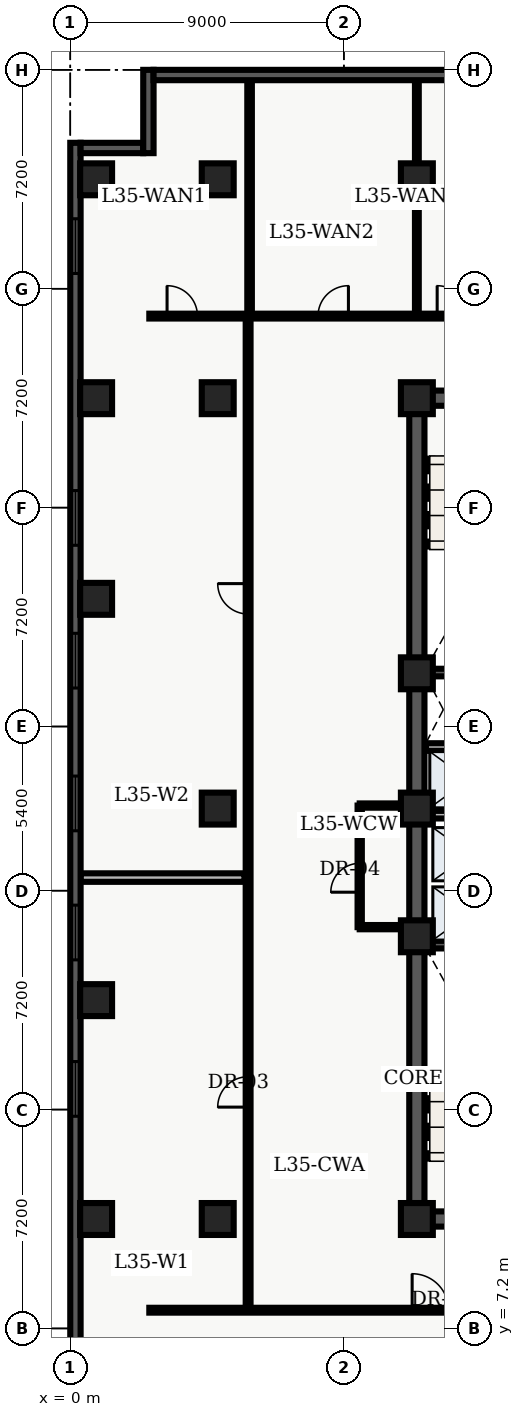
"""IFC4 building model, lengths in metres.
Left out: names, types, materials, properties, quantities, classifications, styles, units other than length and angle.
Written with IfcOpenShell. Run it as: python <this file> out.ifc"""

import sys

from ifc_helpers import new_model, entity, si_unit, converted_unit, direction, frame, origin_with_axes, origin_2d_with_axis, place, context, subcontext, project, spatial, polyline, rectangle, outline, extrude, element, fill, save


model = new_model("IFC4")
c1 = context("Model", 3, precision=1e-05, world=origin_with_axes(), true_north=direction((0.0, 1.0)))
c2 = subcontext(c1, "Body", "Model", "MODEL_VIEW")
j1 = project(units=[si_unit("LENGTHUNIT", "METRE"), converted_unit("PLANEANGLEUNIT", "DEGREE", entity("IfcPlaneAngleMeasure", 0.017), si_unit("PLANEANGLEUNIT", "RADIAN"), dimensions=[0, 0, 0, 0, 0, 0, 0])], contexts=[c1])
p1 = place(None, origin_with_axes())
s1 = spatial("IfcSite", under=j1, at=p1, CompositionType="ELEMENT")
p2 = place(p1, origin_with_axes())
s2 = spatial("IfcBuilding", under=s1, at=p2, CompositionType="ELEMENT")
p3 = place(p2, frame((0.0, 0.0, 144.6), z_axis=(0.0, 0.0, 1.0), x_axis=(1.0, 0.0, 0.0)))
s3 = spatial("IfcBuildingStorey", under=s2, at=p3, CompositionType="ELEMENT", Elevation=144.6)
p4 = place(p3, frame((11.4, 10.8, 0.0), z_axis=(0.0, 0.0, 1.0), x_axis=(0.0, 1.0, 0.0)))
e1 = element("IfcWall", 1, at=p4, inside=s3, PredefinedType="SHEAR", context=c2, shape_type="SweptSolid", body=[
    extrude(outline(polyline([(0.0, -0.25), (27.0, -0.25), (27.0, 0.25), (0.0, 0.25), (0.0, -0.25)])), origin_with_axes(), (0.0, 0.0, 1.0), 3.66),
])
p5 = place(p3, frame((11.4, 10.8, 0.0), z_axis=(0.0, 0.0, 1.0), x_axis=(1.0, 0.0, 0.0)))
e2 = element("IfcWall", 2, at=p5, inside=s3, PredefinedType="SHEAR", context=c2, shape_type="SweptSolid", body=[
    extrude(outline(polyline([(0.0, -0.25), (7.2, -0.25), (7.2, 0.25), (0.0, 0.25), (0.0, -0.25)])), origin_with_axes(), (0.0, 0.0, 1.0), 3.66),
])
p6 = place(p5, frame((2.625, 0.0, 0.0), z_axis=(0.0, 0.0, 1.0), x_axis=(1.0, 0.0, 0.0)))
e3 = element("IfcOpeningElement", 3, at=p6, cuts=e2, PredefinedType="OPENING", context=c2, shape_type="SweptSolid", body=[
    extrude(rectangle(XDim=1.05, YDim=0.52, at=origin_2d_with_axis()), origin_with_axes(), (0.0, 0.0, 1.0), 2.15),
])
p7 = place(p3, frame((11.4, 37.8, 0.0), z_axis=(0.0, 0.0, 1.0), x_axis=(1.0, 0.0, 0.0)))
e4 = element("IfcWall", 4, at=p7, inside=s3, PredefinedType="SHEAR", context=c2, shape_type="SweptSolid", body=[
    extrude(outline(polyline([(0.0, -0.25), (7.2, -0.25), (7.2, 0.25), (0.0, 0.25), (0.0, -0.25)])), origin_with_axes(), (0.0, 0.0, 1.0), 3.66),
])
p8 = place(p7, frame((2.625, 0.0, 0.0), z_axis=(0.0, 0.0, 1.0), x_axis=(1.0, 0.0, 0.0)))
e5 = element("IfcOpeningElement", 5, at=p8, cuts=e4, PredefinedType="OPENING", context=c2, shape_type="SweptSolid", body=[
    extrude(rectangle(XDim=1.05, YDim=0.52, at=origin_2d_with_axis()), origin_with_axes(), (0.0, 0.0, 1.0), 2.15),
])
for number, where, z_axis, x_axis in (
    (6, (11.65, 19.825, 0.0), (0.0, 0.0, 1.0), (1.0, 0.0, 0.0)),
    (7, (11.65, 28.775, 0.0), (0.0, 0.0, 1.0), (1.0, 0.0, 0.0)),
):
    element("IfcWall", number, at=place(p3, frame(where, z_axis=z_axis, x_axis=x_axis)), inside=s3, PredefinedType="SHEAR", context=c2, shape_type="SweptSolid", body=[
        extrude(outline(polyline([(0.0, -0.125), (6.7, -0.125), (6.7, 0.125), (0.0, 0.125), (0.0, -0.125)])), origin_with_axes(), (0.0, 0.0, 1.0), 3.66),
    ])
p9 = place(p3, frame((11.7, 24.1, 0.0), z_axis=(0.0, 0.0, 1.0), x_axis=(1.0, 0.0, 0.0)))
e8 = element("IfcWall", 8, at=p9, inside=s3, PredefinedType="SOLIDWALL", context=c2, shape_type="SweptSolid", body=[
    extrude(outline(polyline([(0.0, -0.125), (6.6, -0.125), (6.6, 0.125), (0.0, 0.125), (0.0, -0.125)])), origin_with_axes(), (0.0, 0.0, 1.0), 2.7),
])
p10 = place(p9, frame((3.6, 0.0, 0.0), z_axis=(0.0, 0.0, 1.0), x_axis=(1.0, 0.0, 0.0)))
e9 = element("IfcOpeningElement", 9, at=p10, cuts=e8, PredefinedType="OPENING", context=c2, shape_type="SweptSolid", body=[
    extrude(rectangle(XDim=0.9, YDim=0.27, at=origin_2d_with_axis()), origin_with_axes(), (0.0, 0.0, 1.0), 2.15),
])
p11 = place(p9, frame((5.65, 0.0, 0.0), z_axis=(0.0, 0.0, 1.0), x_axis=(1.0, 0.0, 0.0)))
e10 = element("IfcOpeningElement", 10, at=p11, cuts=e8, PredefinedType="OPENING", context=c2, shape_type="SweptSolid", body=[
    extrude(rectangle(XDim=0.9, YDim=0.27, at=origin_2d_with_axis()), origin_with_axes(), (0.0, 0.0, 1.0), 2.15),
])
p12 = place(p3, frame((11.7, 26.325, 0.0), z_axis=(0.0, 0.0, 1.0), x_axis=(1.0, 0.0, 0.0)))
e11 = element("IfcWall", 11, at=p12, inside=s3, PredefinedType="SOLIDWALL", context=c2, shape_type="SweptSolid", body=[
    extrude(outline(polyline([(0.0, -0.125), (6.6, -0.125), (6.6, 0.125), (0.0, 0.125), (0.0, -0.125)])), origin_with_axes(), (0.0, 0.0, 1.0), 2.7),
])
p13 = place(p12, frame((3.5, 0.0, 0.0), z_axis=(0.0, 0.0, 1.0), x_axis=(1.0, 0.0, 0.0)))
e12 = element("IfcOpeningElement", 12, at=p13, cuts=e11, PredefinedType="OPENING", context=c2, shape_type="SweptSolid", body=[
    extrude(rectangle(XDim=0.9, YDim=0.27, at=origin_2d_with_axis()), origin_with_axes(), (0.0, 0.0, 1.0), 2.15),
])
for number, where, z_axis, x_axis in (
    (13, (11.4, 10.8, 0.0), (0.0, 0.0, 1.0), (1.0, 0.0, 0.0)),
    (14, (11.4, 20.1, 0.0), (0.0, 0.0, 1.0), (1.0, 0.0, 0.0)),
    (15, (11.4, 24.3, 0.0), (0.0, 0.0, 1.0), (1.0, 0.0, 0.0)),
    (16, (11.4, 28.75, 0.0), (0.0, 0.0, 1.0), (1.0, 0.0, 0.0)),
    (17, (11.4, 37.8, 0.0), (0.0, 0.0, 1.0), (1.0, 0.0, 0.0)),
    (18, (11.4, 45.0, 0.0), (0.0, 0.0, 1.0), (1.0, 0.0, 0.0)),
    (19, (4.85, 10.8, 0.0), (0.0, 0.0, 1.0), (1.0, 0.0, 0.0)),
    (20, (4.85, 24.3, 0.0), (0.0, 0.0, 1.0), (1.0, 0.0, 0.0)),
    (21, (4.85, 37.8, 0.0), (0.0, 0.0, 1.0), (1.0, 0.0, 0.0)),
    (22, (4.85, 45.0, 0.0), (0.0, 0.0, 1.0), (1.0, 0.0, 0.0)),
    (23, (0.85, 10.8, 0.0), (0.0, 0.0, 1.0), (1.0, 0.0, 0.0)),
    (24, (0.85, 18.0, 0.0), (0.0, 0.0, 1.0), (1.0, 0.0, 0.0)),
    (25, (0.85, 31.2, 0.0), (0.0, 0.0, 1.0), (1.0, 0.0, 0.0)),
    (26, (0.85, 37.8, 0.0), (0.0, 0.0, 1.0), (1.0, 0.0, 0.0)),
    (27, (0.85, 45.0, 0.0), (0.0, 0.0, 1.0), (1.0, 0.0, 0.0)),
):
    element("IfcColumn", number, at=place(p3, frame(where, z_axis=z_axis, x_axis=x_axis)), inside=s3, PredefinedType="COLUMN", context=c2, shape_type="SweptSolid", body=[
        extrude(rectangle(XDim=1.05, YDim=1.05, at=origin_2d_with_axis()), origin_with_axes(), (0.0, 0.0, 1.0), 3.9),
    ])
p14 = place(p3, frame((9.52, 20.4, 0.0), z_axis=(0.0, 0.0, 1.0), x_axis=(0.0, 1.0, 0.0)))
e28 = element("IfcWall", 28, at=p14, inside=s3, PredefinedType="PARTITIONING", context=c2, shape_type="SweptSolid", body=[
    extrude(outline(polyline([(0.0, -0.07), (4.0, -0.07), (4.0, 0.07), (0.0, 0.07), (0.0, -0.07)])), origin_with_axes(), (0.0, 0.0, 1.0), 2.7),
])
p15 = place(p14, frame((1.625, 0.0, 0.0), z_axis=(0.0, 0.0, 1.0), x_axis=(1.0, 0.0, 0.0)))
e29 = element("IfcOpeningElement", 29, at=p15, cuts=e28, PredefinedType="OPENING", context=c2, shape_type="SweptSolid", body=[
    extrude(rectangle(XDim=0.95, YDim=0.16, at=origin_2d_with_axis()), origin_with_axes(), (0.0, 0.0, 1.0), 2.15),
])
for number, where, z_axis, x_axis in (
    (30, (9.52, 20.4, 0.0), (0.0, 0.0, 1.0), (1.0, 0.0, 0.0)),
    (31, (9.52, 24.4, 0.0), (0.0, 0.0, 1.0), (1.0, 0.0, 0.0)),
):
    element("IfcWall", number, at=place(p3, frame(where, z_axis=z_axis, x_axis=x_axis)), inside=s3, PredefinedType="PARTITIONING", context=c2, shape_type="SweptSolid", body=[
        extrude(outline(polyline([(0.0, -0.07), (1.58, -0.07), (1.58, 0.07), (0.0, 0.07), (0.0, -0.07)])), origin_with_axes(), (0.0, 0.0, 1.0), 2.7),
    ])
p16 = place(p3, frame((2.6, 7.8, 0.0), z_axis=(0.0, 0.0, 1.0), x_axis=(1.0, 0.0, 0.0)))
e32 = element("IfcWall", 32, at=p16, inside=s3, PredefinedType="PARTITIONING", context=c2, shape_type="SweptSolid", body=[
    extrude(outline(polyline([(0.0, -0.08), (18.55, -0.08), (18.55, 0.08), (0.0, 0.08), (0.0, -0.08)])), origin_with_axes(), (0.0, 0.0, 1.0), 2.7),
])
p17 = place(p16, frame((9.245, 0.0, 0.0), z_axis=(0.0, 0.0, 1.0), x_axis=(1.0, 0.0, 0.0)))
e33 = element("IfcOpeningElement", 33, at=p17, cuts=e32, PredefinedType="OPENING", context=c2, shape_type="SweptSolid", body=[
    extrude(rectangle(XDim=1.2, YDim=0.18, at=origin_2d_with_axis()), origin_with_axes(), (0.0, 0.0, 1.0), 2.2),
])
p18 = place(p3, frame((2.6, 40.5, 0.0), z_axis=(0.0, 0.0, 1.0), x_axis=(1.0, 0.0, 0.0)))
e34 = element("IfcWall", 34, at=p18, inside=s3, PredefinedType="PARTITIONING", context=c2, shape_type="SweptSolid", body=[
    extrude(outline(polyline([(0.0, -0.08), (19.26, -0.08), (19.26, 0.08), (0.0, 0.08), (0.0, -0.08)])), origin_with_axes(), (0.0, 0.0, 1.0), 2.7),
])
p19 = place(p18, frame((1.084, 0.0, 0.0), z_axis=(0.0, 0.0, 1.0), x_axis=(1.0, 0.0, 0.0)))
e35 = element("IfcOpeningElement", 35, at=p19, cuts=e34, PredefinedType="OPENING", context=c2, shape_type="SweptSolid", body=[
    extrude(rectangle(XDim=1.0, YDim=0.18, at=origin_2d_with_axis()), origin_with_axes(), (0.0, 0.0, 1.0), 2.15),
])
p20 = place(p18, frame((6.049, 0.0, 0.0), z_axis=(0.0, 0.0, 1.0), x_axis=(1.0, 0.0, 0.0)))
e36 = element("IfcOpeningElement", 36, at=p20, cuts=e34, PredefinedType="OPENING", context=c2, shape_type="SweptSolid", body=[
    extrude(rectangle(XDim=1.0, YDim=0.18, at=origin_2d_with_axis()), origin_with_axes(), (0.0, 0.0, 1.0), 2.15),
])
p21 = place(p18, frame((9.968, 0.0, 0.0), z_axis=(0.0, 0.0, 1.0), x_axis=(1.0, 0.0, 0.0)))
e37 = element("IfcOpeningElement", 37, at=p21, cuts=e34, PredefinedType="OPENING", context=c2, shape_type="SweptSolid", body=[
    extrude(rectangle(XDim=1.0, YDim=0.18, at=origin_2d_with_axis()), origin_with_axes(), (0.0, 0.0, 1.0), 2.15),
])
p22 = place(p18, frame((13.601, 0.0, 0.0), z_axis=(0.0, 0.0, 1.0), x_axis=(1.0, 0.0, 0.0)))
e38 = element("IfcOpeningElement", 38, at=p22, cuts=e34, PredefinedType="OPENING", context=c2, shape_type="SweptSolid", body=[
    extrude(rectangle(XDim=1.2, YDim=0.18, at=origin_2d_with_axis()), origin_with_axes(), (0.0, 0.0, 1.0), 2.2),
])
p23 = place(p3, frame((5.85, 7.8, 0.0), z_axis=(0.0, 0.0, 1.0), x_axis=(0.0, 1.0, 0.0)))
e39 = element("IfcWall", 39, at=p23, inside=s3, PredefinedType="PARTITIONING", context=c2, shape_type="SweptSolid", body=[
    extrude(outline(polyline([(0.0, -0.08), (32.7, -0.08), (32.7, 0.08), (0.0, 0.08), (0.0, -0.08)])), origin_with_axes(), (0.0, 0.0, 1.0), 2.7),
])
p24 = place(p23, frame((7.181, 0.0, 0.0), z_axis=(0.0, 0.0, 1.0), x_axis=(1.0, 0.0, 0.0)))
e40 = element("IfcOpeningElement", 40, at=p24, cuts=e39, PredefinedType="OPENING", context=c2, shape_type="SweptSolid", body=[
    extrude(rectangle(XDim=1.0, YDim=0.18, at=origin_2d_with_axis()), origin_with_axes(), (0.0, 0.0, 1.0), 2.15),
])
p25 = place(p23, frame((23.401, 0.0, 0.0), z_axis=(0.0, 0.0, 1.0), x_axis=(1.0, 0.0, 0.0)))
e41 = element("IfcOpeningElement", 41, at=p25, cuts=e39, PredefinedType="OPENING", context=c2, shape_type="SweptSolid", body=[
    extrude(rectangle(XDim=1.0, YDim=0.18, at=origin_2d_with_axis()), origin_with_axes(), (0.0, 0.0, 1.0), 2.15),
])
p26 = place(p3, frame((0.335, 22.031, 0.0), z_axis=(0.0, 0.0, 1.0), x_axis=(1.0, 0.0, 0.0)))
e42 = element("IfcWall", 42, at=p26, inside=s3, PredefinedType="PARTITIONING", context=c2, shape_type="SweptSolid", body=[
    extrude(outline(polyline([(0.0, -0.14), (5.395, -0.14), (5.395, 0.14), (0.0, 0.14), (0.0, -0.14)])), origin_with_axes(), (0.0, 0.0, 1.0), 2.7),
])
p27 = place(p3, frame((5.898, 40.6, 0.0), z_axis=(0.0, 0.0, 1.0), x_axis=(0.0, 1.0, 0.0)))
e43 = element("IfcWall", 43, at=p27, inside=s3, PredefinedType="PARTITIONING", context=c2, shape_type="SweptSolid", body=[
    extrude(outline(polyline([(0.0, -0.075), (7.665, -0.075), (7.665, 0.075), (0.0, 0.075), (0.0, -0.075)])), origin_with_axes(), (0.0, 0.0, 1.0), 2.7),
])
p28 = place(p3, frame((11.4, 40.6, 0.0), z_axis=(0.0, 0.0, 1.0), x_axis=(0.0, 1.0, 0.0)))
e44 = element("IfcWall", 44, at=p28, inside=s3, PredefinedType="PARTITIONING", context=c2, shape_type="SweptSolid", body=[
    extrude(outline(polyline([(0.0, -0.062), (7.665, -0.062), (7.665, 0.062), (0.0, 0.062), (0.0, -0.062)])), origin_with_axes(), (0.0, 0.0, 1.0), 2.7),
])
p29 = place(p3, frame((0.17, 2.74, 0.0), z_axis=(0.0, 0.0, 1.0), x_axis=(0.0, 1.0, 0.0)))
e45 = element("IfcWall", 45, at=p29, inside=s3, PredefinedType="SOLIDWALL", context=c2, shape_type="SweptSolid", body=[
    extrude(outline(polyline([(0.0, -0.17), (43.46, -0.17), (43.46, 0.17), (0.0, 0.17), (0.0, -0.17)])), origin_with_axes(), (0.0, 0.0, 1.0), 3.66),
])
p30 = place(p29, frame((2.948, 0.0, 0.45), z_axis=(0.0, 0.0, 1.0), x_axis=(1.0, 0.0, 0.0)))
e46 = element("IfcOpeningElement", 46, at=p30, cuts=e45, PredefinedType="OPENING", context=c2, shape_type="SweptSolid", body=[
    extrude(rectangle(XDim=1.8, YDim=0.36, at=origin_2d_with_axis()), origin_with_axes(), (0.0, 0.0, 1.0), 2.1),
])
p31 = place(p29, frame((12.339, 0.0, 0.45), z_axis=(0.0, 0.0, 1.0), x_axis=(1.0, 0.0, 0.0)))
e47 = element("IfcOpeningElement", 47, at=p31, cuts=e45, PredefinedType="OPENING", context=c2, shape_type="SweptSolid", body=[
    extrude(rectangle(XDim=1.8, YDim=0.36, at=origin_2d_with_axis()), origin_with_axes(), (0.0, 0.0, 1.0), 2.1),
])
p32 = place(p29, frame((17.484, 0.0, 0.45), z_axis=(0.0, 0.0, 1.0), x_axis=(1.0, 0.0, 0.0)))
e48 = element("IfcOpeningElement", 48, at=p32, cuts=e45, PredefinedType="OPENING", context=c2, shape_type="SweptSolid", body=[
    extrude(rectangle(XDim=1.8, YDim=0.36, at=origin_2d_with_axis()), origin_with_axes(), (0.0, 0.0, 1.0), 2.1),
])
p33 = place(p29, frame((21.73, 0.0, 0.45), z_axis=(0.0, 0.0, 1.0), x_axis=(1.0, 0.0, 0.0)))
e49 = element("IfcOpeningElement", 49, at=p33, cuts=e45, PredefinedType="OPENING", context=c2, shape_type="SweptSolid", body=[
    extrude(rectangle(XDim=1.8, YDim=0.36, at=origin_2d_with_axis()), origin_with_axes(), (0.0, 0.0, 1.0), 2.1),
])
p34 = place(p29, frame((26.426, 0.0, 0.45), z_axis=(0.0, 0.0, 1.0), x_axis=(1.0, 0.0, 0.0)))
e50 = element("IfcOpeningElement", 50, at=p34, cuts=e45, PredefinedType="OPENING", context=c2, shape_type="SweptSolid", body=[
    extrude(rectangle(XDim=1.8, YDim=0.36, at=origin_2d_with_axis()), origin_with_axes(), (0.0, 0.0, 1.0), 2.1),
])
p35 = place(p29, frame((31.121, 0.0, 0.45), z_axis=(0.0, 0.0, 1.0), x_axis=(1.0, 0.0, 0.0)))
e51 = element("IfcOpeningElement", 51, at=p35, cuts=e45, PredefinedType="OPENING", context=c2, shape_type="SweptSolid", body=[
    extrude(rectangle(XDim=1.8, YDim=0.36, at=origin_2d_with_axis()), origin_with_axes(), (0.0, 0.0, 1.0), 2.1),
])
p36 = place(p29, frame((40.062, 0.0, 0.45), z_axis=(0.0, 0.0, 1.0), x_axis=(1.0, 0.0, 0.0)))
e52 = element("IfcOpeningElement", 52, at=p36, cuts=e45, PredefinedType="OPENING", context=c2, shape_type="SweptSolid", body=[
    extrude(rectangle(XDim=1.8, YDim=0.36, at=origin_2d_with_axis()), origin_with_axes(), (0.0, 0.0, 1.0), 2.1),
])
p37 = place(p3, frame((0.34, 46.03, 0.0), z_axis=(0.0, 0.0, 1.0), x_axis=(1.0, 0.0, 0.0)))
e53 = element("IfcWall", 53, at=p37, inside=s3, PredefinedType="SOLIDWALL", context=c2, shape_type="SweptSolid", body=[
    extrude(outline(polyline([(0.0, -0.17), (2.06, -0.17), (2.06, 0.17), (0.0, 0.17), (0.0, -0.17)])), origin_with_axes(), (0.0, 0.0, 1.0), 3.66),
])
p38 = place(p3, frame((2.57, 45.86, 0.0), z_axis=(0.0, 0.0, 1.0), x_axis=(0.0, 1.0, 0.0)))
e54 = element("IfcWall", 54, at=p38, inside=s3, PredefinedType="SOLIDWALL", context=c2, shape_type="SweptSolid", body=[
    extrude(outline(polyline([(0.0, -0.17), (2.74, -0.17), (2.74, 0.17), (0.0, 0.17), (0.0, -0.17)])), origin_with_axes(), (0.0, 0.0, 1.0), 3.66),
])
p39 = place(p3, frame((2.74, 48.43, 0.0), z_axis=(0.0, 0.0, 1.0), x_axis=(1.0, 0.0, 0.0)))
e55 = element("IfcWall", 55, at=p39, inside=s3, PredefinedType="SOLIDWALL", context=c2, shape_type="SweptSolid", body=[
    extrude(outline(polyline([(0.0, -0.17), (17.175, -0.17), (17.175, 0.17), (0.0, 0.17), (0.0, -0.17)])), origin_with_axes(), (0.0, 0.0, 1.0), 3.66),
])
p40 = place(p39, frame((13.912, 0.0, 0.45), z_axis=(0.0, 0.0, 1.0), x_axis=(1.0, 0.0, 0.0)))
e56 = element("IfcOpeningElement", 56, at=p40, cuts=e55, PredefinedType="OPENING", context=c2, shape_type="SweptSolid", body=[
    extrude(rectangle(XDim=1.8, YDim=0.36, at=origin_2d_with_axis()), origin_with_axes(), (0.0, 0.0, 1.0), 2.1),
])
p41 = place(p14, frame((1.625, 0.0, 0.0), z_axis=(0.0, 0.0, 1.0), x_axis=(1.0, 0.0, 0.0)))
e57 = element("IfcDoor", 57, at=p41, inside=s3, OperationType="SINGLE_SWING_LEFT", PredefinedType="DOOR", context=c2, shape_type="SweptSolid", body=[
    extrude(rectangle(XDim=0.95, YDim=0.084, at=origin_2d_with_axis()), origin_with_axes(), (0.0, 0.0, 1.0), 2.15),
])
fill(e29, e57)
p42 = place(p23, frame((7.181, 0.0, 0.0), z_axis=(0.0, 0.0, 1.0), x_axis=(1.0, 0.0, 0.0)))
e58 = element("IfcDoor", 58, at=p42, inside=s3, OperationType="SINGLE_SWING_LEFT", PredefinedType="DOOR", context=c2, shape_type="SweptSolid", body=[
    extrude(rectangle(XDim=1.0, YDim=0.09, at=origin_2d_with_axis()), origin_with_axes(), (0.0, 0.0, 1.0), 2.15),
])
fill(e40, e58)
p43 = place(p23, frame((23.401, 0.0, 0.0), z_axis=(0.0, 0.0, 1.0), x_axis=(1.0, 0.0, 0.0)))
e59 = element("IfcDoor", 59, at=p43, inside=s3, OperationType="SINGLE_SWING_RIGHT", PredefinedType="DOOR", context=c2, shape_type="SweptSolid", body=[
    extrude(rectangle(XDim=1.0, YDim=0.09, at=origin_2d_with_axis()), origin_with_axes(), (0.0, 0.0, 1.0), 2.15),
])
fill(e41, e59)
p44 = place(p16, frame((9.245, 0.0, 0.0), z_axis=(0.0, 0.0, 1.0), x_axis=(1.0, 0.0, 0.0)))
e60 = element("IfcDoor", 60, at=p44, inside=s3, OperationType="SINGLE_SWING_LEFT", PredefinedType="DOOR", context=c2, shape_type="SweptSolid", body=[
    extrude(rectangle(XDim=1.2, YDim=0.09, at=origin_2d_with_axis()), origin_with_axes(), (0.0, 0.0, 1.0), 2.2),
])
fill(e33, e60)
p45 = place(p18, frame((1.084, 0.0, 0.0), z_axis=(0.0, 0.0, 1.0), x_axis=(1.0, 0.0, 0.0)))
e61 = element("IfcDoor", 61, at=p45, inside=s3, OperationType="SINGLE_SWING_LEFT", PredefinedType="DOOR", context=c2, shape_type="SweptSolid", body=[
    extrude(rectangle(XDim=1.0, YDim=0.09, at=origin_2d_with_axis()), origin_with_axes(), (0.0, 0.0, 1.0), 2.15),
])
fill(e35, e61)
p46 = place(p18, frame((6.049, 0.0, 0.0), z_axis=(0.0, 0.0, 1.0), x_axis=(1.0, 0.0, 0.0)))
e62 = element("IfcDoor", 62, at=p46, inside=s3, OperationType="SINGLE_SWING_RIGHT", PredefinedType="DOOR", context=c2, shape_type="SweptSolid", body=[
    extrude(rectangle(XDim=1.0, YDim=0.09, at=origin_2d_with_axis()), origin_with_axes(), (0.0, 0.0, 1.0), 2.15),
])
fill(e36, e62)
p47 = place(p18, frame((9.968, 0.0, 0.0), z_axis=(0.0, 0.0, 1.0), x_axis=(1.0, 0.0, 0.0)))
e63 = element("IfcDoor", 63, at=p47, inside=s3, OperationType="SINGLE_SWING_LEFT", PredefinedType="DOOR", context=c2, shape_type="SweptSolid", body=[
    extrude(rectangle(XDim=1.0, YDim=0.09, at=origin_2d_with_axis()), origin_with_axes(), (0.0, 0.0, 1.0), 2.15),
])
fill(e37, e63)
p48 = place(p29, frame((12.339, 0.0, 0.45), z_axis=(0.0, 0.0, 1.0), x_axis=(1.0, 0.0, 0.0)))
e64 = element("IfcWindow", 64, at=p48, inside=s3, PredefinedType="WINDOW", context=c2, shape_type="SweptSolid", body=[
    extrude(rectangle(XDim=1.8, YDim=0.09, at=origin_2d_with_axis()), origin_with_axes(), (0.0, 0.0, 1.0), 2.1),
])
fill(e47, e64)
p49 = place(p29, frame((17.484, 0.0, 0.45), z_axis=(0.0, 0.0, 1.0), x_axis=(1.0, 0.0, 0.0)))
e65 = element("IfcWindow", 65, at=p49, inside=s3, PredefinedType="WINDOW", context=c2, shape_type="SweptSolid", body=[
    extrude(rectangle(XDim=1.8, YDim=0.09, at=origin_2d_with_axis()), origin_with_axes(), (0.0, 0.0, 1.0), 2.1),
])
fill(e48, e65)
p50 = place(p29, frame((21.73, 0.0, 0.45), z_axis=(0.0, 0.0, 1.0), x_axis=(1.0, 0.0, 0.0)))
e66 = element("IfcWindow", 66, at=p50, inside=s3, PredefinedType="WINDOW", context=c2, shape_type="SweptSolid", body=[
    extrude(rectangle(XDim=1.8, YDim=0.09, at=origin_2d_with_axis()), origin_with_axes(), (0.0, 0.0, 1.0), 2.1),
])
fill(e49, e66)
p51 = place(p29, frame((26.426, 0.0, 0.45), z_axis=(0.0, 0.0, 1.0), x_axis=(1.0, 0.0, 0.0)))
e67 = element("IfcWindow", 67, at=p51, inside=s3, PredefinedType="WINDOW", context=c2, shape_type="SweptSolid", body=[
    extrude(rectangle(XDim=1.8, YDim=0.09, at=origin_2d_with_axis()), origin_with_axes(), (0.0, 0.0, 1.0), 2.1),
])
fill(e50, e67)
p52 = place(p29, frame((31.121, 0.0, 0.45), z_axis=(0.0, 0.0, 1.0), x_axis=(1.0, 0.0, 0.0)))
e68 = element("IfcWindow", 68, at=p52, inside=s3, PredefinedType="WINDOW", context=c2, shape_type="SweptSolid", body=[
    extrude(rectangle(XDim=1.8, YDim=0.09, at=origin_2d_with_axis()), origin_with_axes(), (0.0, 0.0, 1.0), 2.1),
])
fill(e51, e68)
p53 = place(p29, frame((40.062, 0.0, 0.45), z_axis=(0.0, 0.0, 1.0), x_axis=(1.0, 0.0, 0.0)))
e69 = element("IfcWindow", 69, at=p53, inside=s3, PredefinedType="WINDOW", context=c2, shape_type="SweptSolid", body=[
    extrude(rectangle(XDim=1.8, YDim=0.09, at=origin_2d_with_axis()), origin_with_axes(), (0.0, 0.0, 1.0), 2.1),
])
fill(e52, e69)
save(model, sys.argv[1])
